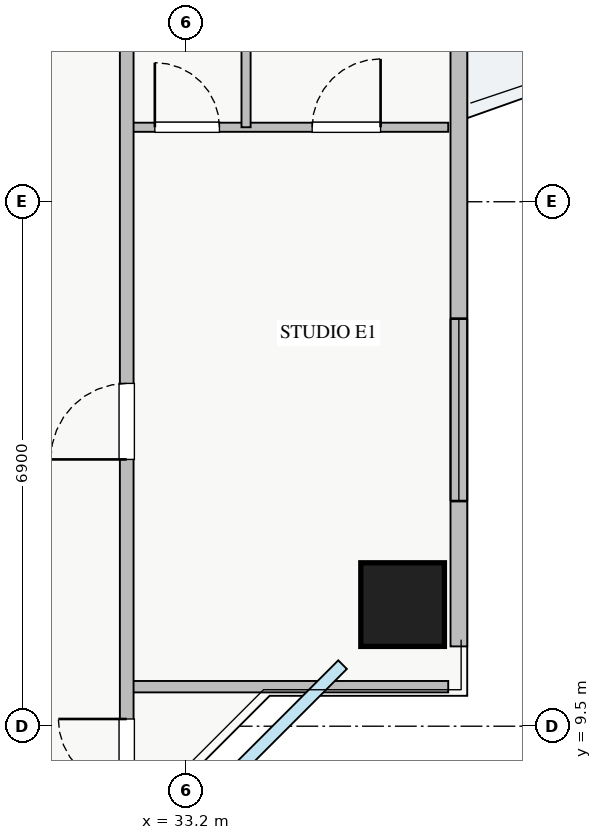
"""IFC4 building model, lengths in metres.
Left out: names, types, materials, properties, quantities, classifications, styles, units other than length and angle.
Written with IfcOpenShell. Run it as: python <this file> out.ifc"""

import sys

from ifc_helpers import new_model, si_unit, direction, frame, frame_2d, origin, origin_2d, place, context, subcontext, project, spatial, rectangle, extrude, source, transform, mapped, element, fill, save


model = new_model("IFC4")
c1 = context("Model", 3, precision=1e-05, world=origin(), true_north=direction((0.0, 1.0)))
c2 = subcontext(c1, "Body", "Model", "MODEL_VIEW")
j1 = project(units=[si_unit("LENGTHUNIT", "METRE"), si_unit("PLANEANGLEUNIT", "RADIAN")], contexts=[c1])
p1 = place(None, origin())
s1 = spatial("IfcSite", under=j1, at=p1, CompositionType="ELEMENT")
p2 = place(p1, origin())
s2 = spatial("IfcBuilding", under=s1, at=p2, CompositionType="ELEMENT")
p3 = place(p2, frame((0.0, 0.0, 116.5)))
s3 = spatial("IfcBuildingStorey", under=s2, at=p3, CompositionType="ELEMENT", Elevation=116.5)
m1 = source(origin(), c2, "Body", "SweptSolid", [
    extrude(rectangle(XDim=1.1, YDim=1.1, at=origin_2d()), origin(), (0.0, 0.0, 1.0), 3.25),
])
p4 = place(p3, frame((36.05, 11.1, 0.0), z_axis=(0.0, 0.0, 1.0), x_axis=(1.0, 0.0, 0.0)))
e1 = element("IfcColumn", 1, at=p4, inside=s3, PredefinedType="COLUMN", context=c2, shape_type="MappedRepresentation", body=[
    mapped(m1, transform((0.0, 0.0, 0.0), x_axis=(1.0, 0.0, 0.0), y_axis=(0.0, 1.0, 0.0), z_axis=(0.0, 0.0, 1.0), scale=1.0)),
])
p5 = place(p3, frame((36.79, 10.55, 0.0), z_axis=(0.0, 0.0, 1.0), x_axis=(0.0, 1.0, 0.0)))
e2 = element("IfcWall", 2, at=p5, inside=s3, PredefinedType="STANDARD", context=c2, shape_type="SweptSolid", body=[
    extrude(rectangle(XDim=24.9, YDim=0.22, at=frame_2d((12.45, 0.0))), origin(), (0.0, 0.0, 1.0), 2.61),
])
p6 = place(p5, frame((13.3, 0.0, 0.0)))
e3 = element("IfcOpeningElement", 3, at=p6, cuts=e2, PredefinedType="OPENING", context=c2, shape_type="SweptSolid", body=[
    extrude(rectangle(XDim=1.2, YDim=2.1, at=frame_2d((0.6, 1.05))), frame((0.0, 0.12, 0.0), z_axis=(0.0, -1.0, 0.0), x_axis=(1.0, 0.0, 0.0)), (0.0, 0.0, 1.0), 0.24),
])
p7 = place(p5, frame((1.912, 0.0, 0.9)))
e4 = element("IfcOpeningElement", 4, at=p7, cuts=e2, PredefinedType="OPENING", context=c2, shape_type="SweptSolid", body=[
    extrude(rectangle(XDim=2.4, YDim=1.48, at=frame_2d((1.2, 0.74))), frame((0.0, 0.12, 0.0), z_axis=(0.0, -1.0, 0.0), x_axis=(1.0, 0.0, 0.0)), (0.0, 0.0, 1.0), 0.24),
])
p8 = place(p5, frame((20.737, 0.0, 0.9)))
e5 = element("IfcOpeningElement", 5, at=p8, cuts=e2, PredefinedType="OPENING", context=c2, shape_type="SweptSolid", body=[
    extrude(rectangle(XDim=2.1, YDim=1.48, at=frame_2d((1.05, 0.74))), frame((0.0, 0.12, 0.0), z_axis=(0.0, -1.0, 0.0), x_axis=(1.0, 0.0, 0.0)), (0.0, 0.0, 1.0), 0.24),
])
p9 = place(p5, frame((14.72, 0.0, 0.9)))
e6 = element("IfcOpeningElement", 6, at=p9, cuts=e2, PredefinedType="OPENING", context=c2, shape_type="SweptSolid", body=[
    extrude(rectangle(XDim=0.9, YDim=1.2, at=frame_2d((0.45, 0.6))), frame((0.0, 0.12, 0.0), z_axis=(0.0, -1.0, 0.0), x_axis=(1.0, 0.0, 0.0)), (0.0, 0.0, 1.0), 0.24),
])
p10 = place(p3, frame((32.42, 10.02, 0.0), z_axis=(0.0, 0.0, 1.0), x_axis=(1.0, 0.0, 0.0)))
e7 = element("IfcWall", 7, at=p10, inside=s3, PredefinedType="PARTITIONING", context=c2, shape_type="SweptSolid", body=[
    extrude(rectangle(XDim=4.23, YDim=0.15, at=frame_2d((2.115, 0.0))), origin(), (0.0, 0.0, 1.0), 3.07),
])
p11 = place(p3, frame((32.42, 17.38, 0.0), z_axis=(0.0, 0.0, 1.0), x_axis=(1.0, 0.0, 0.0)))
e8 = element("IfcWall", 8, at=p11, inside=s3, PredefinedType="PLUMBINGWALL", context=c2, shape_type="SweptSolid", body=[
    extrude(rectangle(XDim=4.23, YDim=0.12, at=frame_2d((2.115, 0.0))), origin(), (0.0, 0.0, 1.0), 3.07),
])
p12 = place(p11, frame((0.37, 0.0, 0.0)))
e9 = element("IfcOpeningElement", 9, at=p12, cuts=e8, PredefinedType="OPENING", context=c2, shape_type="SweptSolid", body=[
    extrude(rectangle(XDim=0.85, YDim=2.05, at=frame_2d((0.425, 1.025))), frame((0.0, 0.07, 0.0), z_axis=(0.0, -1.0, 0.0), x_axis=(1.0, 0.0, 0.0)), (0.0, 0.0, 1.0), 0.14),
])
p13 = place(p11, frame((2.44, 0.0, 0.0)))
e10 = element("IfcOpeningElement", 10, at=p13, cuts=e8, PredefinedType="OPENING", context=c2, shape_type="SweptSolid", body=[
    extrude(rectangle(XDim=0.9, YDim=2.05, at=frame_2d((0.45, 1.025))), frame((0.0, 0.07, 0.0), z_axis=(0.0, -1.0, 0.0), x_axis=(1.0, 0.0, 0.0)), (0.0, 0.0, 1.0), 0.14),
])
p14 = place(p3, frame((33.99, 17.38, 0.0), z_axis=(0.0, 0.0, 1.0), x_axis=(0.0, 1.0, 0.0)))
e11 = element("IfcWall", 11, at=p14, inside=s3, PredefinedType="PLUMBINGWALL", context=c2, shape_type="SweptSolid", body=[
    extrude(rectangle(XDim=6.27, YDim=0.12, at=frame_2d((3.135, 0.0))), origin(), (0.0, 0.0, 1.0), 3.07),
])
p15 = place(p3, frame((32.42, 8.25, 0.0), z_axis=(0.0, 0.0, 1.0), x_axis=(0.0, 1.0, 0.0)))
e12 = element("IfcWall", 12, at=p15, inside=s3, PredefinedType="PARTITIONING", context=c2, shape_type="SweptSolid", body=[
    extrude(rectangle(XDim=29.5, YDim=0.18, at=frame_2d((14.75, 0.0))), origin(), (0.0, 0.0, 1.0), 3.07),
])
p16 = place(p15, frame((28.155, 0.0, 0.0)))
e13 = element("IfcOpeningElement", 13, at=p16, cuts=e12, PredefinedType="OPENING", context=c2, shape_type="SweptSolid", body=[
    extrude(rectangle(XDim=0.9, YDim=2.05, at=frame_2d((0.45, 1.025))), frame((0.0, 0.1, 0.0), z_axis=(0.0, -1.0, 0.0), x_axis=(1.0, 0.0, 0.0)), (0.0, 0.0, 1.0), 0.2),
])
p17 = place(p15, frame((0.445, 0.0, 0.0)))
e14 = element("IfcOpeningElement", 14, at=p17, cuts=e12, PredefinedType="OPENING", context=c2, shape_type="SweptSolid", body=[
    extrude(rectangle(XDim=0.9, YDim=2.05, at=frame_2d((0.45, 1.025))), frame((0.0, 0.1, 0.0), z_axis=(0.0, -1.0, 0.0), x_axis=(1.0, 0.0, 0.0)), (0.0, 0.0, 1.0), 0.2),
])
p18 = place(p15, frame((4.76, 0.0, 0.0)))
e15 = element("IfcOpeningElement", 15, at=p18, cuts=e12, PredefinedType="OPENING", context=c2, shape_type="SweptSolid", body=[
    extrude(rectangle(XDim=1.0, YDim=2.05, at=frame_2d((0.5, 1.025))), frame((0.0, 0.1, 0.0), z_axis=(0.0, -1.0, 0.0), x_axis=(1.0, 0.0, 0.0)), (0.0, 0.0, 1.0), 0.2),
])
p19 = place(p15, frame((18.04, 0.0, 0.0)))
e16 = element("IfcOpeningElement", 16, at=p19, cuts=e12, PredefinedType="OPENING", context=c2, shape_type="SweptSolid", body=[
    extrude(rectangle(XDim=1.0, YDim=2.05, at=frame_2d((0.5, 1.025))), frame((0.0, 0.1, 0.0), z_axis=(0.0, -1.0, 0.0), x_axis=(1.0, 0.0, 0.0)), (0.0, 0.0, 1.0), 0.2),
])
m2 = source(origin(), c2, "Body", "SweptSolid", [
    extrude(rectangle(XDim=2.4, YDim=1.48, at=frame_2d((1.2, 0.74))), frame((0.0, 0.03, 0.0), z_axis=(0.0, -1.0, 0.0), x_axis=(1.0, 0.0, 0.0)), (0.0, 0.0, 1.0), 0.06),
])
p20 = place(p7, origin())
e17 = element("IfcWindow", 17, at=p20, inside=s3, PartitioningType="TRIPLE_PANEL_VERTICAL", PredefinedType="WINDOW", context=c2, shape_type="MappedRepresentation", body=[
    mapped(m2, transform((0.0, 0.0, 0.0), x_axis=(1.0, 0.0, 0.0), y_axis=(0.0, 1.0, 0.0), z_axis=(0.0, 0.0, 1.0), scale=1.0)),
])
fill(e4, e17)
m3 = source(origin(), c2, "Body", "SweptSolid", [
    extrude(rectangle(XDim=0.85, YDim=2.05, at=frame_2d((0.425, 1.025))), frame((0.0, 0.025, 0.0), z_axis=(0.0, -1.0, 0.0), x_axis=(1.0, 0.0, 0.0)), (0.0, 0.0, 1.0), 0.05),
])
p21 = place(p12, origin())
e18 = element("IfcDoor", 18, at=p21, inside=s3, OperationType="SINGLE_SWING_LEFT", PredefinedType="DOOR", context=c2, shape_type="MappedRepresentation", body=[
    mapped(m3, transform((0.0, 0.0, 0.0), x_axis=(1.0, 0.0, 0.0), y_axis=(0.0, 1.0, 0.0), z_axis=(0.0, 0.0, 1.0), scale=1.0)),
])
fill(e9, e18)
m4 = source(origin(), c2, "Body", "SweptSolid", [
    extrude(rectangle(XDim=0.9, YDim=2.05, at=frame_2d((0.45, 1.025))), frame((0.0, 0.025, 0.0), z_axis=(0.0, -1.0, 0.0), x_axis=(1.0, 0.0, 0.0)), (0.0, 0.0, 1.0), 0.05),
])
p22 = place(p13, origin())
e19 = element("IfcDoor", 19, at=p22, inside=s3, OperationType="SINGLE_SWING_RIGHT", PredefinedType="DOOR", context=c2, shape_type="MappedRepresentation", body=[
    mapped(m4, transform((0.0, 0.0, 0.0), x_axis=(1.0, 0.0, 0.0), y_axis=(0.0, 1.0, 0.0), z_axis=(0.0, 0.0, 1.0), scale=1.0)),
])
fill(e10, e19)
p23 = place(p17, origin())
e20 = element("IfcDoor", 20, at=p23, inside=s3, OperationType="SINGLE_SWING_RIGHT", PredefinedType="DOOR", context=c2, shape_type="MappedRepresentation", body=[
    mapped(m4, transform((0.0, 0.0, 0.0), x_axis=(1.0, 0.0, 0.0), y_axis=(0.0, 1.0, 0.0), z_axis=(0.0, 0.0, 1.0), scale=1.0)),
])
fill(e14, e20)
m5 = source(origin(), c2, "Body", "SweptSolid", [
    extrude(rectangle(XDim=1.0, YDim=2.05, at=frame_2d((0.5, 1.025))), frame((0.0, 0.025, 0.0), z_axis=(0.0, -1.0, 0.0), x_axis=(1.0, 0.0, 0.0)), (0.0, 0.0, 1.0), 0.05),
])
p24 = place(p18, origin())
e21 = element("IfcDoor", 21, at=p24, inside=s3, OperationType="SINGLE_SWING_LEFT", PredefinedType="DOOR", context=c2, shape_type="MappedRepresentation", body=[
    mapped(m5, transform((0.0, 0.0, 0.0), x_axis=(1.0, 0.0, 0.0), y_axis=(0.0, 1.0, 0.0), z_axis=(0.0, 0.0, 1.0), scale=1.0)),
])
fill(e15, e21)
save(model, sys.argv[1])
